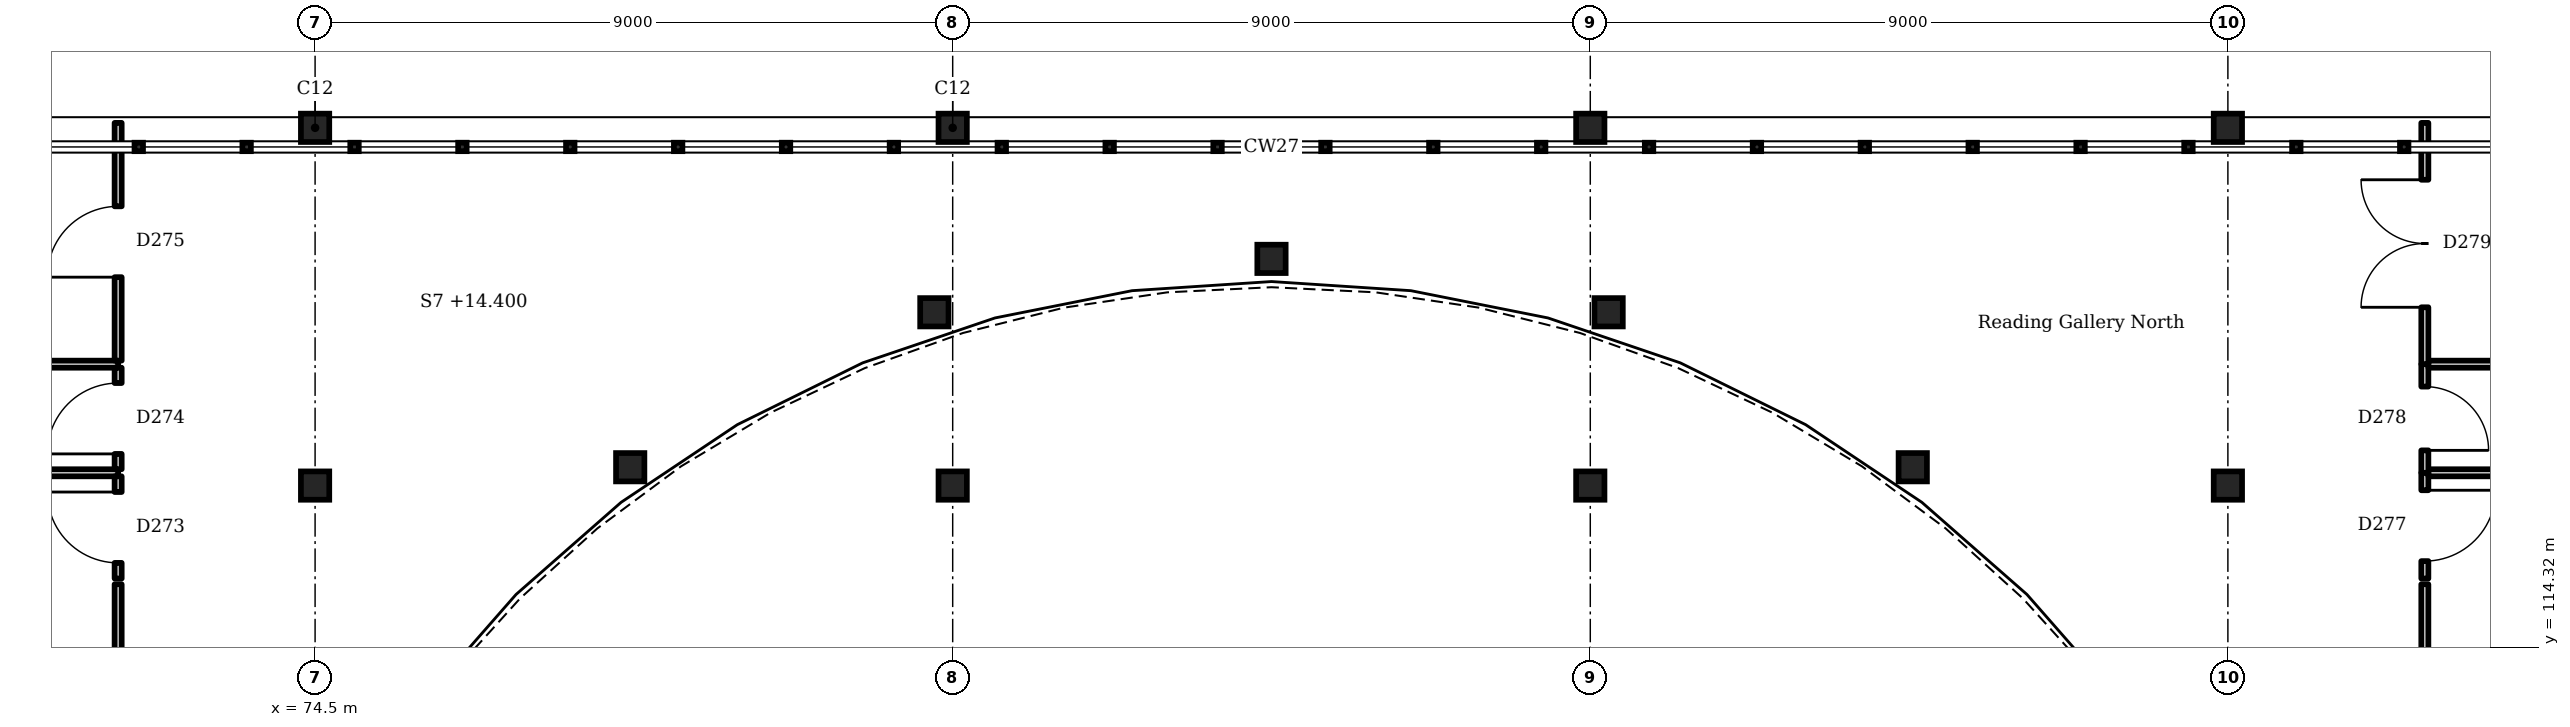
"""IFC4 building model, lengths in metres.
Left out: names, types, materials, properties, quantities, classifications, styles, units other than length and angle.
Written with IfcOpenShell. Run it as: python <this file> out.ifc"""

import sys

from ifc_helpers import new_model, si_unit, direction, frame, frame_2d, origin, origin_2d, place, context, subcontext, project, spatial, rectangle, hollow_circle, extrude, element, fill, save


model = new_model("IFC4")
c1 = context("Model", 3, precision=1e-05, world=origin(), true_north=direction((0.0, 1.0)))
c2 = subcontext(c1, "Body", "Model", "MODEL_VIEW")
j1 = project(units=[si_unit("LENGTHUNIT", "METRE"), si_unit("PLANEANGLEUNIT", "RADIAN")], contexts=[c1])
p1 = place(None, origin())
s1 = spatial("IfcSite", under=j1, at=p1, CompositionType="ELEMENT")
p2 = place(p1, origin())
s2 = spatial("IfcBuilding", under=s1, at=p2, CompositionType="ELEMENT")
p3 = place(p2, frame((0.0, 0.0, 14.4)))
s3 = spatial("IfcBuildingStorey", under=s2, at=p3, CompositionType="ELEMENT", Elevation=14.4)
for number, where, z_axis, x_axis in (
    (1, (97.052, 116.859, 0.0), (0.0, 0.0, 1.0), (1.0, 0.0, 0.0)),
    (2, (92.759, 119.046, 0.0), (0.0, 0.0, 1.0), (1.0, 0.0, 0.0)),
    (3, (88.0, 119.8, 0.0), (0.0, 0.0, 1.0), (1.0, 0.0, 0.0)),
    (4, (83.241, 119.046, 0.0), (0.0, 0.0, 1.0), (1.0, 0.0, 0.0)),
    (5, (78.948, 116.859, 0.0), (0.0, 0.0, 1.0), (1.0, 0.0, 0.0)),
):
    element("IfcColumn", number, at=place(p3, frame(where, z_axis=z_axis, x_axis=x_axis)), inside=s3, PredefinedType="COLUMN", context=c2, shape_type="SweptSolid", body=[
        extrude(hollow_circle(Radius=0.203, WallThickness=0.016, at=origin_2d()), origin(), (0.0, 0.0, 1.0), 4.5),
    ])
for number, where, z_axis, x_axis in (
    (6, (74.5, 121.65, 0.0), (0.0, 0.0, 1.0), (1.0, 0.0, 0.0)),
    (7, (83.5, 121.65, 0.0), (0.0, 0.0, 1.0), (1.0, 0.0, 0.0)),
    (8, (92.5, 121.65, 0.0), (0.0, 0.0, 1.0), (1.0, 0.0, 0.0)),
    (9, (101.5, 121.65, 0.0), (0.0, 0.0, 1.0), (1.0, 0.0, 0.0)),
    (10, (74.5, 116.6, 0.0), (0.0, 0.0, 1.0), (1.0, 0.0, 0.0)),
    (11, (83.5, 116.6, 0.0), (0.0, 0.0, 1.0), (1.0, 0.0, 0.0)),
    (12, (92.5, 116.6, 0.0), (0.0, 0.0, 1.0), (1.0, 0.0, 0.0)),
    (13, (101.5, 116.6, 0.0), (0.0, 0.0, 1.0), (1.0, 0.0, 0.0)),
):
    element("IfcColumn", number, at=place(p3, frame(where, z_axis=z_axis, x_axis=x_axis)), inside=s3, PredefinedType="COLUMN", context=c2, shape_type="SweptSolid", body=[
        extrude(hollow_circle(Radius=0.178, WallThickness=0.008, at=origin_2d()), origin(), (0.0, 0.0, 1.0), 4.5),
    ])
p4 = place(p3, frame((65.678, 116.781, 0.0), z_axis=(0.0, 0.0, 1.0), x_axis=(1.0, 0.0, 0.0)))
e14 = element("IfcWall", 14, at=p4, inside=s3, PredefinedType="PARTITIONING", context=c2, shape_type="SweptSolid", body=[
    extrude(rectangle(XDim=6.042, YDim=0.1, at=frame_2d((3.021, 0.0))), origin(), (0.0, 0.0, 1.0), 3.85),
])
p5 = place(p3, frame((71.72, 116.73, 0.0), z_axis=(0.0, 0.0, 1.0), x_axis=(0.0, -1.0, 0.0)))
e15 = element("IfcWall", 15, at=p5, inside=s3, PredefinedType="PARTITIONING", context=c2, shape_type="SweptSolid", body=[
    extrude(rectangle(XDim=1.443, YDim=0.1, at=frame_2d((0.722, 0.0))), origin(), (0.0, 0.0, 1.0), 4.35),
])
p6 = place(p5, frame((0.222, 0.0, 0.0)))
e16 = element("IfcOpeningElement", 16, at=p6, cuts=e15, PredefinedType="OPENING", context=c2, shape_type="SweptSolid", body=[
    extrude(rectangle(XDim=1.0, YDim=2.1, at=frame_2d((0.5, 1.05))), frame((0.0, 0.06, 0.0), z_axis=(0.0, -1.0, 0.0), x_axis=(1.0, 0.0, 0.0)), (0.0, 0.0, 1.0), 0.12),
])
p7 = place(p3, frame((71.72, 115.207, 0.0), z_axis=(0.0, 0.0, 1.0), x_axis=(0.0, -1.0, 0.0)))
e17 = element("IfcWall", 17, at=p7, inside=s3, PredefinedType="PARTITIONING", context=c2, shape_type="SweptSolid", body=[
    extrude(rectangle(XDim=4.352, YDim=0.1, at=frame_2d((2.176, 0.0))), origin(), (0.0, 0.0, 1.0), 4.35),
])
p8 = place(p3, frame((65.58, 118.314, 0.0), z_axis=(0.0, 0.0, 1.0), x_axis=(1.0, 0.0, 0.0)))
e18 = element("IfcWall", 18, at=p8, inside=s3, PredefinedType="PARTITIONING", context=c2, shape_type="SweptSolid", body=[
    extrude(rectangle(XDim=6.14, YDim=0.1, at=frame_2d((3.07, 0.0))), origin(), (0.0, 0.0, 1.0), 3.85),
])
p9 = place(p3, frame((71.72, 118.264, 0.0), z_axis=(0.0, 0.0, 1.0), x_axis=(0.0, -1.0, 0.0)))
e19 = element("IfcWall", 19, at=p9, inside=s3, PredefinedType="PARTITIONING", context=c2, shape_type="SweptSolid", body=[
    extrude(rectangle(XDim=1.433, YDim=0.1, at=frame_2d((0.717, 0.0))), origin(), (0.0, 0.0, 1.0), 4.35),
])
p10 = place(p9, frame((0.217, 0.0, 0.0)))
e20 = element("IfcOpeningElement", 20, at=p10, cuts=e19, PredefinedType="OPENING", context=c2, shape_type="SweptSolid", body=[
    extrude(rectangle(XDim=1.0, YDim=2.1, at=frame_2d((0.5, 1.05))), frame((0.0, 0.06, 0.0), z_axis=(0.0, -1.0, 0.0), x_axis=(1.0, 0.0, 0.0)), (0.0, 0.0, 1.0), 0.12),
])
p11 = place(p3, frame((71.72, 121.72, 0.0), z_axis=(0.0, 0.0, 1.0), x_axis=(0.0, -1.0, 0.0)))
e21 = element("IfcWall", 21, at=p11, inside=s3, PredefinedType="PARTITIONING", context=c2, shape_type="SweptSolid", body=[
    extrude(rectangle(XDim=3.356, YDim=0.1, at=frame_2d((1.678, 0.0))), origin(), (0.0, 0.0, 1.0), 3.95),
])
p12 = place(p11, frame((1.178, 0.0, 0.0)))
e22 = element("IfcOpeningElement", 22, at=p12, cuts=e21, PredefinedType="OPENING", context=c2, shape_type="SweptSolid", body=[
    extrude(rectangle(XDim=1.0, YDim=2.1, at=frame_2d((0.5, 1.05))), frame((0.0, 0.06, 0.0), z_axis=(0.0, -1.0, 0.0), x_axis=(1.0, 0.0, 0.0)), (0.0, 0.0, 1.0), 0.12),
])
p13 = place(p3, frame((104.28, 110.855, 0.0), z_axis=(0.0, 0.0, 1.0), x_axis=(0.0, 1.0, 0.0)))
e23 = element("IfcWall", 23, at=p13, inside=s3, PredefinedType="PARTITIONING", context=c2, shape_type="SweptSolid", body=[
    extrude(rectangle(XDim=4.352, YDim=0.1, at=frame_2d((2.176, 0.0))), origin(), (0.0, 0.0, 1.0), 4.35),
])
p14 = place(p3, frame((104.28, 115.287, 0.0), z_axis=(0.0, 0.0, 1.0), x_axis=(0.0, 1.0, 0.0)))
e24 = element("IfcWall", 24, at=p14, inside=s3, PredefinedType="PARTITIONING", context=c2, shape_type="SweptSolid", body=[
    extrude(rectangle(XDim=1.493, YDim=0.1, at=frame_2d((0.747, 0.0))), origin(), (0.0, 0.0, 1.0), 4.35),
])
p15 = place(p14, frame((0.247, 0.0, 0.0)))
e25 = element("IfcOpeningElement", 25, at=p15, cuts=e24, PredefinedType="OPENING", context=c2, shape_type="SweptSolid", body=[
    extrude(rectangle(XDim=1.0, YDim=2.1, at=frame_2d((0.5, 1.05))), frame((0.0, 0.06, 0.0), z_axis=(0.0, -1.0, 0.0), x_axis=(1.0, 0.0, 0.0)), (0.0, 0.0, 1.0), 0.12),
])
p16 = place(p3, frame((104.33, 116.781, 0.0), z_axis=(0.0, 0.0, 1.0), x_axis=(1.0, 0.0, 0.0)))
e26 = element("IfcWall", 26, at=p16, inside=s3, PredefinedType="PARTITIONING", context=c2, shape_type="SweptSolid", body=[
    extrude(rectangle(XDim=5.992, YDim=0.1, at=frame_2d((2.996, 0.0))), origin(), (0.0, 0.0, 1.0), 3.85),
])
p17 = place(p3, frame((104.28, 116.781, 0.0), z_axis=(0.0, 0.0, 1.0), x_axis=(0.0, 1.0, 0.0)))
e27 = element("IfcWall", 27, at=p17, inside=s3, PredefinedType="PARTITIONING", context=c2, shape_type="SweptSolid", body=[
    extrude(rectangle(XDim=1.533, YDim=0.1, at=frame_2d((0.767, 0.0))), origin(), (0.0, 0.0, 1.0), 4.35),
])
p18 = place(p17, frame((0.317, 0.0, 0.0)))
e28 = element("IfcOpeningElement", 28, at=p18, cuts=e27, PredefinedType="OPENING", context=c2, shape_type="SweptSolid", body=[
    extrude(rectangle(XDim=0.9, YDim=2.1, at=frame_2d((0.45, 1.05))), frame((0.0, 0.06, 0.0), z_axis=(0.0, -1.0, 0.0), x_axis=(1.0, 0.0, 0.0)), (0.0, 0.0, 1.0), 0.12),
])
p19 = place(p3, frame((104.33, 118.314, 0.0), z_axis=(0.0, 0.0, 1.0), x_axis=(1.0, 0.0, 0.0)))
e29 = element("IfcWall", 29, at=p19, inside=s3, PredefinedType="PARTITIONING", context=c2, shape_type="SweptSolid", body=[
    extrude(rectangle(XDim=6.09, YDim=0.1, at=frame_2d((3.045, 0.0))), origin(), (0.0, 0.0, 1.0), 3.85),
])
p20 = place(p3, frame((104.28, 118.314, 0.0), z_axis=(0.0, 0.0, 1.0), x_axis=(0.0, 1.0, 0.0)))
e30 = element("IfcWall", 30, at=p20, inside=s3, PredefinedType="PARTITIONING", context=c2, shape_type="SweptSolid", body=[
    extrude(rectangle(XDim=3.406, YDim=0.1, at=frame_2d((1.703, 0.0))), origin(), (0.0, 0.0, 1.0), 3.95),
])
p21 = place(p20, frame((0.803, 0.0, 0.0)))
e31 = element("IfcOpeningElement", 31, at=p21, cuts=e30, PredefinedType="OPENING", context=c2, shape_type="SweptSolid", body=[
    extrude(rectangle(XDim=1.8, YDim=2.1, at=frame_2d((0.9, 1.05))), frame((0.0, 0.06, 0.0), z_axis=(0.0, -1.0, 0.0), x_axis=(1.0, 0.0, 0.0)), (0.0, 0.0, 1.0), 0.12),
])
p22 = place(p6, frame((1.0, 0.0, 0.0), z_axis=(0.0, 0.0, 1.0), x_axis=(-1.0, 0.0, 0.0)))
e32 = element("IfcDoor", 32, at=p22, inside=s3, OperationType="SINGLE_SWING_LEFT", PredefinedType="DOOR", context=c2, shape_type="SweptSolid", body=[
    extrude(rectangle(XDim=1.0, YDim=2.1, at=frame_2d((0.5, 1.05))), frame((0.0, 0.025, 0.0), z_axis=(0.0, -1.0, 0.0), x_axis=(1.0, 0.0, 0.0)), (0.0, 0.0, 1.0), 0.05),
])
fill(e16, e32)
p23 = place(p10, frame((1.0, 0.0, 0.0), z_axis=(0.0, 0.0, 1.0), x_axis=(-1.0, 0.0, 0.0)))
e33 = element("IfcDoor", 33, at=p23, inside=s3, OperationType="SINGLE_SWING_RIGHT", PredefinedType="DOOR", context=c2, shape_type="SweptSolid", body=[
    extrude(rectangle(XDim=1.0, YDim=2.1, at=frame_2d((0.5, 1.05))), frame((0.0, 0.025, 0.0), z_axis=(0.0, -1.0, 0.0), x_axis=(1.0, 0.0, 0.0)), (0.0, 0.0, 1.0), 0.05),
])
fill(e20, e33)
p24 = place(p12, frame((1.0, 0.0, 0.0), z_axis=(0.0, 0.0, 1.0), x_axis=(-1.0, 0.0, 0.0)))
e34 = element("IfcDoor", 34, at=p24, inside=s3, OperationType="SINGLE_SWING_RIGHT", PredefinedType="DOOR", context=c2, shape_type="SweptSolid", body=[
    extrude(rectangle(XDim=1.0, YDim=2.1, at=frame_2d((0.5, 1.05))), frame((0.0, 0.025, 0.0), z_axis=(0.0, -1.0, 0.0), x_axis=(1.0, 0.0, 0.0)), (0.0, 0.0, 1.0), 0.05),
])
fill(e22, e34)
p25 = place(p15, frame((1.0, 0.0, 0.0), z_axis=(0.0, 0.0, 1.0), x_axis=(-1.0, 0.0, 0.0)))
e35 = element("IfcDoor", 35, at=p25, inside=s3, OperationType="SINGLE_SWING_RIGHT", PredefinedType="DOOR", context=c2, shape_type="SweptSolid", body=[
    extrude(rectangle(XDim=1.0, YDim=2.1, at=frame_2d((0.5, 1.05))), frame((0.0, 0.025, 0.0), z_axis=(0.0, -1.0, 0.0), x_axis=(1.0, 0.0, 0.0)), (0.0, 0.0, 1.0), 0.05),
])
fill(e25, e35)
p26 = place(p18, frame((0.9, 0.0, 0.0), z_axis=(0.0, 0.0, 1.0), x_axis=(-1.0, 0.0, 0.0)))
e36 = element("IfcDoor", 36, at=p26, inside=s3, OperationType="SINGLE_SWING_LEFT", PredefinedType="DOOR", context=c2, shape_type="SweptSolid", body=[
    extrude(rectangle(XDim=0.9, YDim=2.1, at=frame_2d((0.45, 1.05))), frame((0.0, 0.025, 0.0), z_axis=(0.0, -1.0, 0.0), x_axis=(1.0, 0.0, 0.0)), (0.0, 0.0, 1.0), 0.05),
])
fill(e28, e36)
p27 = place(p21, origin())
e37 = element("IfcDoor", 37, at=p27, inside=s3, OperationType="DOUBLE_DOOR_SINGLE_SWING", PredefinedType="DOOR", context=c2, shape_type="SweptSolid", body=[
    extrude(rectangle(XDim=1.8, YDim=2.1, at=frame_2d((0.9, 1.05))), frame((0.0, 0.025, 0.0), z_axis=(0.0, -1.0, 0.0), x_axis=(1.0, 0.0, 0.0)), (0.0, 0.0, 1.0), 0.05),
])
fill(e31, e37)
save(model, sys.argv[1])
